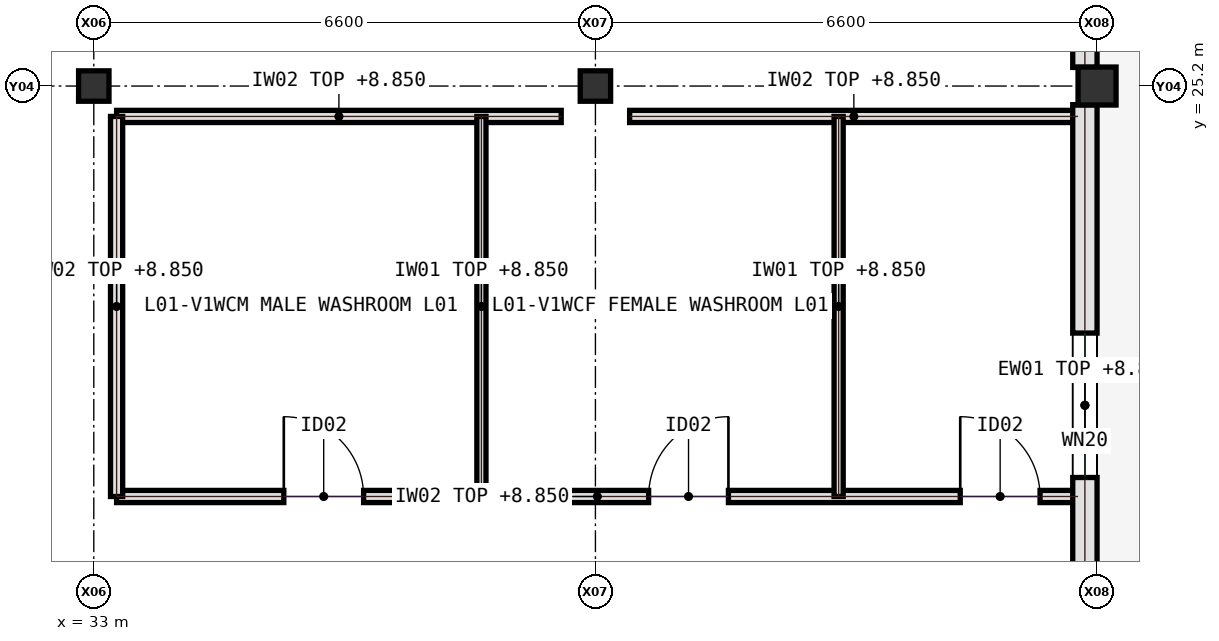
"""IFC4 building model, lengths in metres.
Left out: names, types, materials, properties, quantities, classifications, styles, units other than length and angle.
Written with IfcOpenShell. Run it as: python <this file> out.ifc"""

import sys

from ifc_helpers import new_model, si_unit, direction, frame, frame_2d, origin, origin_2d, place, context, subcontext, project, spatial, rectangle, extrude, element, fill, save


model = new_model("IFC4")
c1 = context("Model", 3, precision=1e-05, world=origin(), true_north=direction((0.0, 1.0)))
c2 = subcontext(c1, "Body", "Model", "MODEL_VIEW")
j1 = project(units=[si_unit("LENGTHUNIT", "METRE"), si_unit("PLANEANGLEUNIT", "RADIAN")], contexts=[c1])
p1 = place(None, origin())
s1 = spatial("IfcSite", under=j1, at=p1, CompositionType="ELEMENT")
p2 = place(p1, origin())
s2 = spatial("IfcBuilding", under=s1, at=p2, CompositionType="ELEMENT")
p3 = place(p2, frame((0.0, 0.0, 5.4)))
s3 = spatial("IfcBuildingStorey", under=s2, at=p3, CompositionType="ELEMENT", Elevation=5.4)
for number, where, z_axis, x_axis in (
    (1, (33.0, 25.2, 0.0), (0.0, 0.0, 1.0), (1.0, 0.0, 0.0)),
    (2, (39.6, 25.2, 0.0), (0.0, 0.0, 1.0), (1.0, 0.0, 0.0)),
):
    element("IfcColumn", number, at=place(p3, frame(where, z_axis=z_axis, x_axis=x_axis)), inside=s3, PredefinedType="COLUMN", context=c2, shape_type="SweptSolid", body=[
        extrude(rectangle(XDim=0.4, YDim=0.4, at=origin_2d()), origin(), (0.0, 0.0, 1.0), 4.5),
    ])
p4 = place(p3, frame((46.2, 25.2, 0.0), z_axis=(0.0, 0.0, 1.0), x_axis=(1.0, 0.0, 0.0)))
e3 = element("IfcColumn", 3, at=p4, inside=s3, PredefinedType="COLUMN", context=c2, shape_type="SweptSolid", body=[
    extrude(rectangle(XDim=0.5, YDim=0.5, at=origin_2d()), origin(), (0.0, 0.0, 1.0), 4.5),
])
p5 = place(p3, frame((33.3, 19.8, 0.0), z_axis=(0.0, 0.0, 1.0), x_axis=(1.0, 0.0, 0.0)))
e4 = element("IfcWall", 4, at=p5, inside=s3, PredefinedType="PARTITIONING", context=c2, shape_type="SweptSolid", body=[
    extrude(rectangle(XDim=12.65, YDim=0.16, at=frame_2d((6.325, 0.0))), origin(), (0.0, 0.0, 1.0), 3.45),
])
p6 = place(p5, frame((2.2, 0.0, 0.0)))
e5 = element("IfcOpeningElement", 5, at=p6, cuts=e4, PredefinedType="OPENING", context=c2, shape_type="SweptSolid", body=[
    extrude(rectangle(XDim=1.05, YDim=2.15, at=frame_2d((0.525, 1.075))), frame((0.0, 0.09, 0.0), z_axis=(0.0, -1.0, 0.0), x_axis=(1.0, 0.0, 0.0)), (0.0, 0.0, 1.0), 0.18),
])
p7 = place(p5, frame((7.0, 0.0, 0.0)))
e6 = element("IfcOpeningElement", 6, at=p7, cuts=e4, PredefinedType="OPENING", context=c2, shape_type="SweptSolid", body=[
    extrude(rectangle(XDim=1.05, YDim=2.15, at=frame_2d((0.525, 1.075))), frame((0.0, 0.09, 0.0), z_axis=(0.0, -1.0, 0.0), x_axis=(1.0, 0.0, 0.0)), (0.0, 0.0, 1.0), 0.18),
])
p8 = place(p5, frame((11.1, 0.0, 0.0)))
e7 = element("IfcOpeningElement", 7, at=p8, cuts=e4, PredefinedType="OPENING", context=c2, shape_type="SweptSolid", body=[
    extrude(rectangle(XDim=1.05, YDim=2.15, at=frame_2d((0.525, 1.075))), frame((0.0, 0.09, 0.0), z_axis=(0.0, -1.0, 0.0), x_axis=(1.0, 0.0, 0.0)), (0.0, 0.0, 1.0), 0.18),
])
p9 = place(p3, frame((33.3, 24.8, 0.0), z_axis=(0.0, 0.0, 1.0), x_axis=(1.0, 0.0, 0.0)))
e8 = element("IfcWall", 8, at=p9, inside=s3, PredefinedType="PARTITIONING", context=c2, shape_type="SweptSolid", body=[
    extrude(rectangle(XDim=5.85, YDim=0.16, at=frame_2d((2.925, 0.0))), origin(), (0.0, 0.0, 1.0), 3.45),
])
p10 = place(p3, frame((40.05, 24.8, 0.0), z_axis=(0.0, 0.0, 1.0), x_axis=(1.0, 0.0, 0.0)))
e9 = element("IfcWall", 9, at=p10, inside=s3, PredefinedType="PARTITIONING", context=c2, shape_type="SweptSolid", body=[
    extrude(rectangle(XDim=5.9, YDim=0.16, at=frame_2d((2.95, 0.0))), origin(), (0.0, 0.0, 1.0), 3.45),
])
p11 = place(p3, frame((33.3, 19.8, 0.0), z_axis=(0.0, 0.0, 1.0), x_axis=(0.0, 1.0, 0.0)))
e10 = element("IfcWall", 10, at=p11, inside=s3, PredefinedType="PARTITIONING", context=c2, shape_type="SweptSolid", body=[
    extrude(rectangle(XDim=5.0, YDim=0.16, at=frame_2d((2.5, 0.0))), origin(), (0.0, 0.0, 1.0), 3.45),
])
for number, where, z_axis, x_axis in (
    (11, (38.1, 19.8, 0.0), (0.0, 0.0, 1.0), (0.0, 1.0, 0.0)),
    (12, (42.8, 19.8, 0.0), (0.0, 0.0, 1.0), (0.0, 1.0, 0.0)),
):
    element("IfcWall", number, at=place(p3, frame(where, z_axis=z_axis, x_axis=x_axis)), inside=s3, PredefinedType="PARTITIONING", context=c2, shape_type="SweptSolid", body=[
        extrude(rectangle(XDim=5.0, YDim=0.12, at=frame_2d((2.5, 0.0))), origin(), (0.0, 0.0, 1.0), 3.45),
    ])
p12 = place(p3, frame((46.04, 17.045, 0.0), z_axis=(0.0, 0.0, 1.0), x_axis=(0.0, 1.0, 0.0)))
e13 = element("IfcWall", 13, at=p12, inside=s3, PredefinedType="SOLIDWALL", context=c2, shape_type="SweptSolid", body=[
    extrude(rectangle(XDim=7.91, YDim=0.32, at=frame_2d((3.955, 0.0))), origin(), (0.0, 0.0, 1.0), 3.485),
])
p13 = place(p12, frame((3.005, 0.0, 0.95)))
e14 = element("IfcOpeningElement", 14, at=p13, cuts=e13, PredefinedType="OPENING", context=c2, shape_type="SweptSolid", body=[
    extrude(rectangle(XDim=1.9, YDim=1.85, at=frame_2d((0.95, 0.925))), frame((0.0, 0.17, 0.0), z_axis=(0.0, -1.0, 0.0), x_axis=(1.0, 0.0, 0.0)), (0.0, 0.0, 1.0), 0.34),
])
p14 = place(p3, frame((46.04, 25.445, 0.0), z_axis=(0.0, 0.0, 1.0), x_axis=(0.0, 1.0, 0.0)))
e15 = element("IfcWall", 15, at=p14, inside=s3, PredefinedType="SOLIDWALL", context=c2, shape_type="SweptSolid", body=[
    extrude(rectangle(XDim=7.91, YDim=0.32, at=frame_2d((3.955, 0.0))), origin(), (0.0, 0.0, 1.0), 3.635),
])
p15 = place(p14, frame((3.405, 0.0, 0.0)))
e16 = element("IfcOpeningElement", 16, at=p15, cuts=e15, PredefinedType="OPENING", context=c2, shape_type="SweptSolid", body=[
    extrude(rectangle(XDim=1.1, YDim=2.2, at=frame_2d((0.55, 1.1))), frame((0.0, 0.17, 0.0), z_axis=(0.0, -1.0, 0.0), x_axis=(1.0, 0.0, 0.0)), (0.0, 0.0, 1.0), 0.34),
])
p16 = place(p6, origin())
e17 = element("IfcDoor", 17, at=p16, inside=s3, OperationType="SINGLE_SWING_LEFT", PredefinedType="DOOR", context=c2, shape_type="SweptSolid", body=[
    extrude(rectangle(XDim=1.05, YDim=2.15, at=frame_2d((0.525, 1.075))), frame((0.0, 0.025, 0.0), z_axis=(0.0, -1.0, 0.0), x_axis=(1.0, 0.0, 0.0)), (0.0, 0.0, 1.0), 0.05),
])
fill(e5, e17)
p17 = place(p7, origin())
e18 = element("IfcDoor", 18, at=p17, inside=s3, OperationType="SINGLE_SWING_RIGHT", PredefinedType="DOOR", context=c2, shape_type="SweptSolid", body=[
    extrude(rectangle(XDim=1.05, YDim=2.15, at=frame_2d((0.525, 1.075))), frame((0.0, 0.025, 0.0), z_axis=(0.0, -1.0, 0.0), x_axis=(1.0, 0.0, 0.0)), (0.0, 0.0, 1.0), 0.05),
])
fill(e6, e18)
p18 = place(p8, origin())
e19 = element("IfcDoor", 19, at=p18, inside=s3, OperationType="SINGLE_SWING_LEFT", PredefinedType="DOOR", context=c2, shape_type="SweptSolid", body=[
    extrude(rectangle(XDim=1.05, YDim=2.15, at=frame_2d((0.525, 1.075))), frame((0.0, 0.025, 0.0), z_axis=(0.0, -1.0, 0.0), x_axis=(1.0, 0.0, 0.0)), (0.0, 0.0, 1.0), 0.05),
])
fill(e7, e19)
p19 = place(p13, origin())
e20 = element("IfcWindow", 20, at=p19, inside=s3, PartitioningType="SINGLE_PANEL", PredefinedType="WINDOW", context=c2, shape_type="SweptSolid", body=[
    extrude(rectangle(XDim=1.9, YDim=1.85, at=frame_2d((0.95, 0.925))), frame((0.0, 0.03, 0.0), z_axis=(0.0, -1.0, 0.0), x_axis=(1.0, 0.0, 0.0)), (0.0, 0.0, 1.0), 0.06),
])
fill(e14, e20)
save(model, sys.argv[1])
